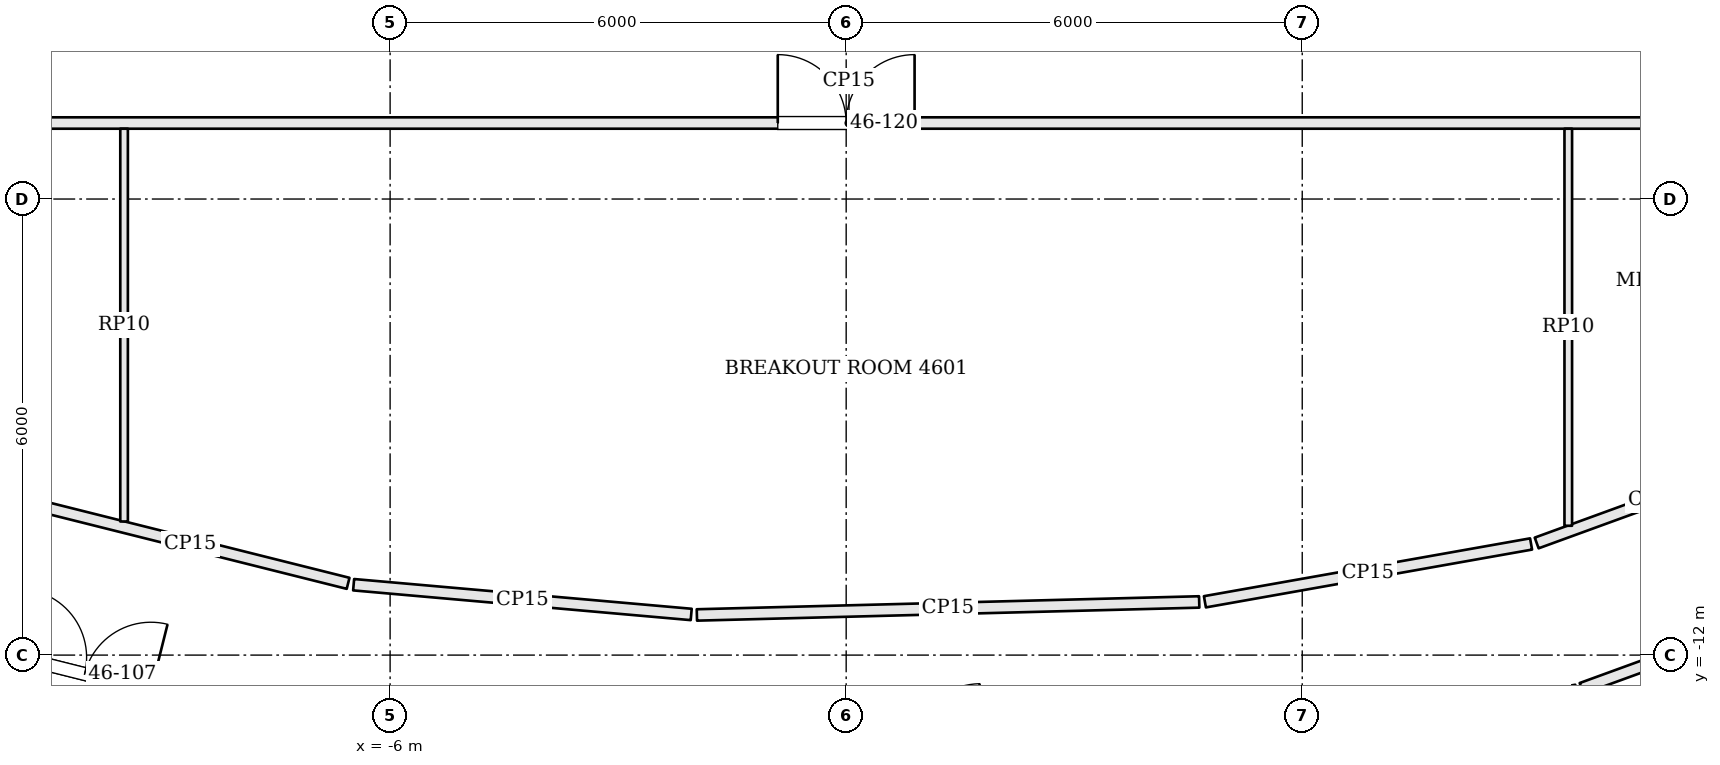
"""IFC4 building model, lengths in metres.
Left out: names, types, materials, properties, quantities, classifications, styles, units other than length and angle.
Written with IfcOpenShell. Run it as: python <this file> out.ifc"""

import sys

from ifc_helpers import new_model, si_unit, direction, frame, frame_2d, origin, place, context, subcontext, project, spatial, rectangle, extrude, element, fill, save


model = new_model("IFC4")
c1 = context("Model", 3, precision=1e-05, world=origin(), true_north=direction((0.0, 1.0)))
c2 = subcontext(c1, "Body", "Model", "MODEL_VIEW")
j1 = project(units=[si_unit("LENGTHUNIT", "METRE"), si_unit("PLANEANGLEUNIT", "RADIAN")], contexts=[c1])
p1 = place(None, origin())
s1 = spatial("IfcSite", under=j1, at=p1, CompositionType="ELEMENT")
p2 = place(p1, origin())
s2 = spatial("IfcBuilding", under=s1, at=p2, CompositionType="ELEMENT")
p3 = place(p2, frame((0.0, 0.0, 189.6)))
s3 = spatial("IfcBuildingStorey", under=s2, at=p3, CompositionType="ELEMENT", Elevation=189.6)
p4 = place(p3, frame((-11.319, -11.923, 0.0), z_axis=(0.0, 0.0, 1.0), x_axis=(0.969990815038, -0.243141561114, 0.0)))
e1 = element("IfcWall", 1, at=p4, inside=s3, PredefinedType="PARTITIONING", context=c2, shape_type="SweptSolid", body=[
    extrude(rectangle(XDim=4.645, YDim=0.15, at=frame_2d((2.323, 0.0))), origin(), (0.0, 0.0, 1.0), 3.084),
])
p5 = place(p4, frame((0.439, 0.0, 0.0)))
e2 = element("IfcOpeningElement", 2, at=p5, cuts=e1, PredefinedType="OPENING", context=c2, shape_type="SweptSolid", body=[
    extrude(rectangle(XDim=1.8, YDim=2.1, at=frame_2d((0.9, 1.05))), frame((0.0, 0.085, 0.0), z_axis=(0.0, -1.0, 0.0), x_axis=(1.0, 0.0, 0.0)), (0.0, 0.0, 1.0), 0.17),
])
p6 = place(p3, frame((8.684, -12.627, 0.0), z_axis=(0.0, 0.0, 1.0), x_axis=(0.984625439098, 0.174678976069, 0.0)))
e3 = element("IfcWall", 3, at=p6, inside=s3, PredefinedType="PARTITIONING", context=c2, shape_type="SweptSolid", body=[
    extrude(rectangle(XDim=0.935, YDim=0.15, at=frame_2d((0.468, 0.0))), origin(), (0.0, 0.0, 1.0), 3.084),
])
p7 = place(p3, frame((9.676, -12.438, 0.0), z_axis=(0.0, 0.0, 1.0), x_axis=(0.939640289748, 0.342163887461, 0.0)))
e4 = element("IfcWall", 4, at=p7, inside=s3, PredefinedType="PARTITIONING", context=c2, shape_type="SweptSolid", body=[
    extrude(rectangle(XDim=3.68, YDim=0.15, at=frame_2d((1.84, 0.0))), origin(), (0.0, 0.0, 1.0), 3.084),
])
p8 = place(p7, frame((1.45, 0.0, 0.0)))
e5 = element("IfcOpeningElement", 5, at=p8, cuts=e4, PredefinedType="OPENING", context=c2, shape_type="SweptSolid", body=[
    extrude(rectangle(XDim=1.8, YDim=2.1, at=frame_2d((0.9, 1.05))), frame((0.0, 0.085, 0.0), z_axis=(0.0, -1.0, 0.0), x_axis=(1.0, 0.0, 0.0)), (0.0, 0.0, 1.0), 0.17),
])
p9 = place(p3, frame((12.178, -9.398, 0.0), z_axis=(0.0, 0.0, 1.0), x_axis=(-0.939609240084, -0.342249143093, 0.0)))
e6 = element("IfcWall", 6, at=p9, inside=s3, PredefinedType="PARTITIONING", context=c2, shape_type="SweptSolid", body=[
    extrude(rectangle(XDim=3.292, YDim=0.15, at=frame_2d((1.646, 0.0))), origin(), (0.0, 0.0, 1.0), 3.084),
])
p10 = place(p3, frame((9.01, -10.538, 0.0), z_axis=(0.0, 0.0, 1.0), x_axis=(-0.984645638575, -0.174565077936, 0.0)))
e7 = element("IfcWall", 7, at=p10, inside=s3, PredefinedType="PARTITIONING", context=c2, shape_type="SweptSolid", body=[
    extrude(rectangle(XDim=4.358, YDim=0.15, at=frame_2d((2.179, 0.0))), origin(), (0.0, 0.0, 1.0), 3.084),
])
p11 = place(p3, frame((4.645, -11.301, 0.0), z_axis=(0.0, 0.0, 1.0), x_axis=(-0.9996648469, -0.02588810291, 0.0)))
e8 = element("IfcWall", 8, at=p11, inside=s3, PredefinedType="PARTITIONING", context=c2, shape_type="SweptSolid", body=[
    extrude(rectangle(XDim=6.611, YDim=0.15, at=frame_2d((3.305, 0.0))), origin(), (0.0, 0.0, 1.0), 3.084),
])
p12 = place(p3, frame((-2.039, -11.465, 0.0), z_axis=(0.0, 0.0, 1.0), x_axis=(-0.996139855484, 0.087780341286, 0.0)))
e9 = element("IfcWall", 9, at=p12, inside=s3, PredefinedType="PARTITIONING", context=c2, shape_type="SweptSolid", body=[
    extrude(rectangle(XDim=4.458, YDim=0.15, at=frame_2d((2.229, 0.0))), origin(), (0.0, 0.0, 1.0), 3.084),
])
p13 = place(p3, frame((-6.553, -11.056, 0.0), z_axis=(0.0, 0.0, 1.0), x_axis=(-0.970004917182, 0.243085294995, 0.0)))
e10 = element("IfcWall", 10, at=p13, inside=s3, PredefinedType="PARTITIONING", context=c2, shape_type="SweptSolid", body=[
    extrude(rectangle(XDim=4.284, YDim=0.15, at=frame_2d((2.142, 0.0))), origin(), (0.0, 0.0, 1.0), 3.084),
])
p14 = place(p3, frame((-14.925, -5.0, 0.0), z_axis=(0.0, 0.0, 1.0), x_axis=(1.0, 0.0, 0.0)))
e11 = element("IfcWall", 11, at=p14, inside=s3, PredefinedType="PARTITIONING", context=c2, shape_type="SweptSolid", body=[
    extrude(rectangle(XDim=29.925, YDim=0.15, at=frame_2d((14.962, 0.0))), origin(), (0.0, 0.0, 1.0), 3.084),
])
p15 = place(p14, frame((14.025, 0.0, 0.0)))
e12 = element("IfcOpeningElement", 12, at=p15, cuts=e11, PredefinedType="OPENING", context=c2, shape_type="SweptSolid", body=[
    extrude(rectangle(XDim=1.8, YDim=2.1, at=frame_2d((0.9, 1.05))), frame((0.0, 0.085, 0.0), z_axis=(0.0, -1.0, 0.0), x_axis=(1.0, 0.0, 0.0)), (0.0, 0.0, 1.0), 0.17),
])
p16 = place(p3, frame((-9.5, -10.242, 0.0), z_axis=(0.0, 0.0, 1.0), x_axis=(0.0, 1.0, 0.0)))
e13 = element("IfcWall", 13, at=p16, inside=s3, PredefinedType="PARTITIONING", context=c2, shape_type="SweptSolid", body=[
    extrude(rectangle(XDim=5.167, YDim=0.1, at=frame_2d((2.583, 0.0))), origin(), (0.0, 0.0, 1.0), 3.084),
])
p17 = place(p3, frame((9.5, -10.299, 0.0), z_axis=(0.0, 0.0, 1.0), x_axis=(0.0, 1.0, 0.0)))
e14 = element("IfcWall", 14, at=p17, inside=s3, PredefinedType="PARTITIONING", context=c2, shape_type="SweptSolid", body=[
    extrude(rectangle(XDim=5.224, YDim=0.1, at=frame_2d((2.612, 0.0))), origin(), (0.0, 0.0, 1.0), 3.084),
])
p18 = place(p5, origin())
e15 = element("IfcDoor", 15, at=p18, inside=s3, OperationType="DOUBLE_DOOR_SINGLE_SWING", PredefinedType="DOOR", context=c2, shape_type="SweptSolid", body=[
    extrude(rectangle(XDim=1.8, YDim=2.1, at=frame_2d((0.9, 1.05))), frame((0.0, 0.025, 0.0), z_axis=(0.0, -1.0, 0.0), x_axis=(1.0, 0.0, 0.0)), (0.0, 0.0, 1.0), 0.05),
])
fill(e2, e15)
p19 = place(p15, origin())
e16 = element("IfcDoor", 16, at=p19, inside=s3, OperationType="DOUBLE_DOOR_SINGLE_SWING", PredefinedType="DOOR", context=c2, shape_type="SweptSolid", body=[
    extrude(rectangle(XDim=1.8, YDim=2.1, at=frame_2d((0.9, 1.05))), frame((0.0, 0.025, 0.0), z_axis=(0.0, -1.0, 0.0), x_axis=(1.0, 0.0, 0.0)), (0.0, 0.0, 1.0), 0.05),
])
fill(e12, e16)
save(model, sys.argv[1])
